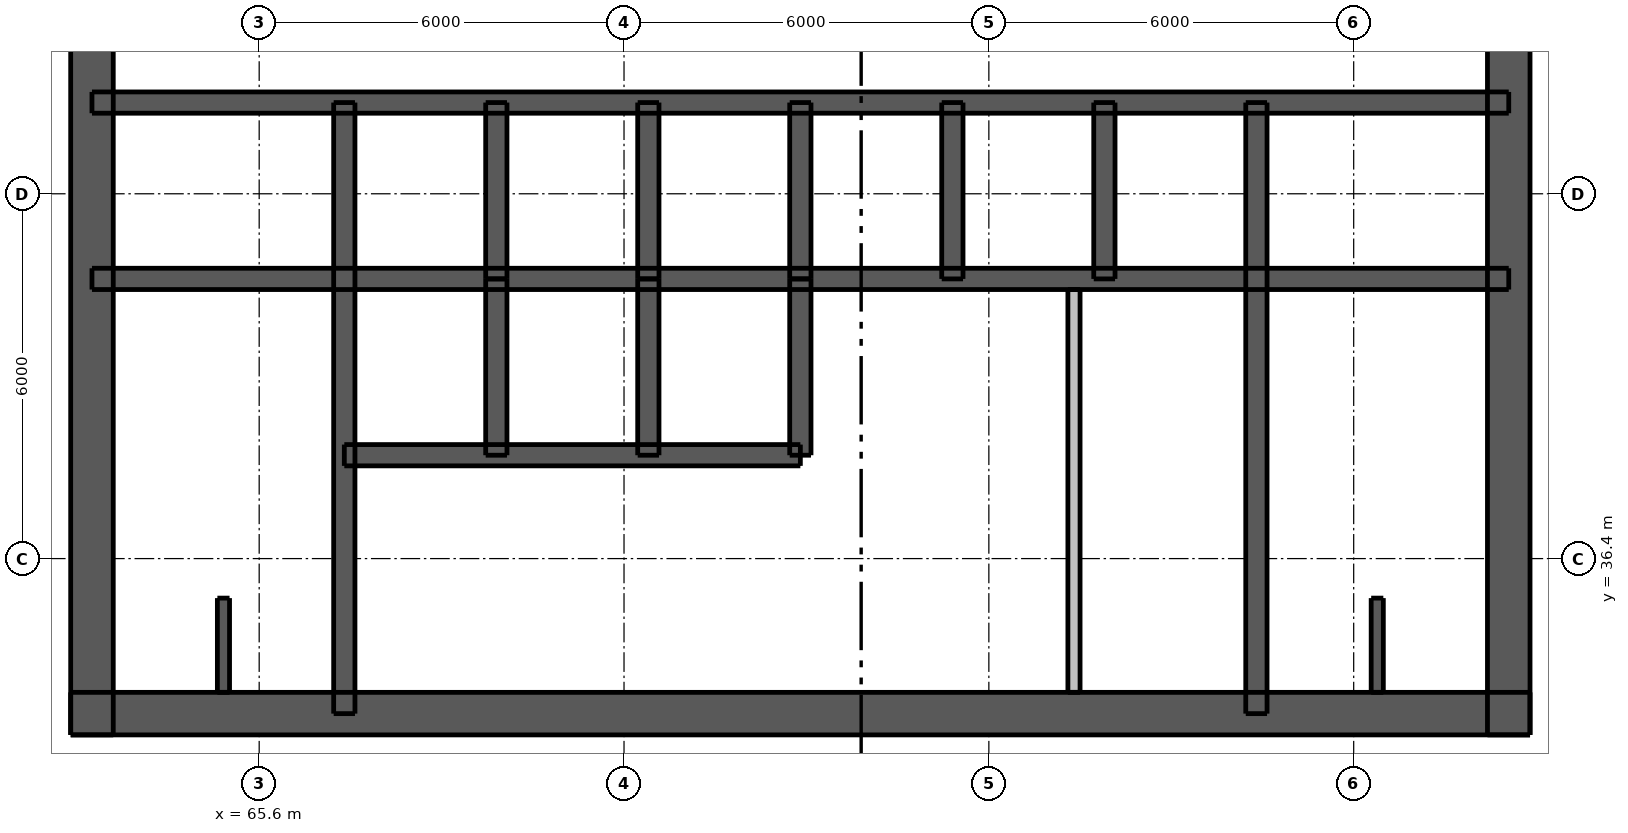
"""IFC4 building model, lengths in metres.
Left out: names, types, materials, properties, quantities, classifications, styles, units other than length and angle.
Written with IfcOpenShell. Run it as: python <this file> out.ifc"""

import sys

from ifc_helpers import new_model, si_unit, direction, frame, frame_2d, origin, place, context, subcontext, project, spatial, rectangle, extrude, element, fill, save


model = new_model("IFC4")
c1 = context("Model", 3, precision=1e-05, world=origin(), true_north=direction((0.0, 1.0)))
c2 = subcontext(c1, "Body", "Model", "MODEL_VIEW")
j1 = project(units=[si_unit("LENGTHUNIT", "METRE"), si_unit("PLANEANGLEUNIT", "RADIAN")], contexts=[c1])
p1 = place(None, origin())
s1 = spatial("IfcSite", under=j1, at=p1, CompositionType="ELEMENT")
p2 = place(p1, origin())
s2 = spatial("IfcBuilding", under=s1, at=p2, CompositionType="ELEMENT")
p3 = place(p2, frame((0.0, 0.0, 178.0)))
s3 = spatial("IfcBuildingStorey", under=s2, at=p3, CompositionType="ELEMENT", Elevation=178.0)
p4 = place(p3, frame((62.5, 33.85, 0.0), z_axis=(0.0, 0.0, 1.0), x_axis=(1.0, 0.0, 0.0)))
e1 = element("IfcWall", 1, at=p4, inside=s3, PredefinedType="SHEAR", context=c2, shape_type="SweptSolid", body=[
    extrude(rectangle(XDim=24.0, YDim=0.7, at=frame_2d((12.0, 0.0))), origin(), (0.0, 0.0, 1.0), 8.75),
])
p5 = place(p4, frame((3.025, 0.0, 0.0)))
e2 = element("IfcOpeningElement", 2, at=p5, cuts=e1, PredefinedType="OPENING", context=c2, shape_type="SweptSolid", body=[
    extrude(rectangle(XDim=1.1, YDim=2.1, at=frame_2d((0.55, 1.05))), frame((0.0, 0.36, 0.0), z_axis=(0.0, -1.0, 0.0), x_axis=(1.0, 0.0, 0.0)), (0.0, 0.0, 1.0), 0.72),
])
p6 = place(p4, frame((0.9, 0.0, 0.0)))
e3 = element("IfcOpeningElement", 3, at=p6, cuts=e1, PredefinedType="OPENING", context=c2, shape_type="SweptSolid", body=[
    extrude(rectangle(XDim=1.1, YDim=2.1, at=frame_2d((0.55, 1.05))), frame((0.0, 0.36, 0.0), z_axis=(0.0, -1.0, 0.0), x_axis=(1.0, 0.0, 0.0)), (0.0, 0.0, 1.0), 0.72),
])
p7 = place(p4, frame((22.0, 0.0, 0.0)))
e4 = element("IfcOpeningElement", 4, at=p7, cuts=e1, PredefinedType="OPENING", context=c2, shape_type="SweptSolid", body=[
    extrude(rectangle(XDim=1.1, YDim=2.1, at=frame_2d((0.55, 1.05))), frame((0.0, 0.36, 0.0), z_axis=(0.0, -1.0, 0.0), x_axis=(1.0, 0.0, 0.0)), (0.0, 0.0, 1.0), 0.72),
])
p8 = place(p4, frame((19.875, 0.0, 0.0)))
e5 = element("IfcOpeningElement", 5, at=p8, cuts=e1, PredefinedType="OPENING", context=c2, shape_type="SweptSolid", body=[
    extrude(rectangle(XDim=1.1, YDim=2.1, at=frame_2d((0.55, 1.05))), frame((0.0, 0.36, 0.0), z_axis=(0.0, -1.0, 0.0), x_axis=(1.0, 0.0, 0.0)), (0.0, 0.0, 1.0), 0.72),
])
p9 = place(p4, frame((7.125, 0.0, 0.0)))
e6 = element("IfcOpeningElement", 6, at=p9, cuts=e1, PredefinedType="OPENING", context=c2, shape_type="SweptSolid", body=[
    extrude(rectangle(XDim=1.1, YDim=2.1, at=frame_2d((0.55, 1.05))), frame((0.0, 0.36, 0.0), z_axis=(0.0, -1.0, 0.0), x_axis=(1.0, 0.0, 0.0)), (0.0, 0.0, 1.0), 0.72),
])
p10 = place(p4, frame((17.5, 0.0, 0.0)))
e7 = element("IfcOpeningElement", 7, at=p10, cuts=e1, PredefinedType="OPENING", context=c2, shape_type="SweptSolid", body=[
    extrude(rectangle(XDim=0.9, YDim=2.1, at=frame_2d((0.45, 1.05))), frame((0.0, 0.36, 0.0), z_axis=(0.0, -1.0, 0.0), x_axis=(1.0, 0.0, 0.0)), (0.0, 0.0, 1.0), 0.72),
])
p11 = place(p3, frame((62.85, 33.5, 0.0), z_axis=(0.0, 0.0, 1.0), x_axis=(0.0, 1.0, 0.0)))
e8 = element("IfcWall", 8, at=p11, inside=s3, PredefinedType="SHEAR", context=c2, shape_type="SweptSolid", body=[
    extrude(rectangle(XDim=24.0, YDim=0.7, at=frame_2d((12.0, 0.0))), origin(), (0.0, 0.0, 1.0), 8.75),
])
p12 = place(p11, frame((11.2, 0.0, 0.0)))
e9 = element("IfcOpeningElement", 9, at=p12, cuts=e8, PredefinedType="OPENING", context=c2, shape_type="SweptSolid", body=[
    extrude(rectangle(XDim=1.6, YDim=2.1, at=frame_2d((0.8, 1.05))), frame((0.0, 0.36, 0.0), z_axis=(0.0, -1.0, 0.0), x_axis=(1.0, 0.0, 0.0)), (0.0, 0.0, 1.0), 0.72),
])
p13 = place(p3, frame((86.15, 33.5, 0.0), z_axis=(0.0, 0.0, 1.0), x_axis=(0.0, 1.0, 0.0)))
e10 = element("IfcWall", 10, at=p13, inside=s3, PredefinedType="SHEAR", context=c2, shape_type="SweptSolid", body=[
    extrude(rectangle(XDim=24.0, YDim=0.7, at=frame_2d((12.0, 0.0))), origin(), (0.0, 0.0, 1.0), 8.75),
])
p14 = place(p13, frame((11.2, 0.0, 0.0)))
e11 = element("IfcOpeningElement", 11, at=p14, cuts=e10, PredefinedType="OPENING", context=c2, shape_type="SweptSolid", body=[
    extrude(rectangle(XDim=1.6, YDim=2.1, at=frame_2d((0.8, 1.05))), frame((0.0, 0.36, 0.0), z_axis=(0.0, -1.0, 0.0), x_axis=(1.0, 0.0, 0.0)), (0.0, 0.0, 1.0), 0.72),
])
p15 = place(p3, frame((62.85, 41.0, 0.0), z_axis=(0.0, 0.0, 1.0), x_axis=(1.0, 0.0, 0.0)))
e12 = element("IfcWall", 12, at=p15, inside=s3, PredefinedType="SHEAR", context=c2, shape_type="SweptSolid", body=[
    extrude(rectangle(XDim=23.3, YDim=0.35, at=frame_2d((11.65, 0.0))), origin(), (0.0, 0.0, 1.0), 8.75),
])
p16 = place(p3, frame((62.85, 43.9, 0.0), z_axis=(0.0, 0.0, 1.0), x_axis=(1.0, 0.0, 0.0)))
e13 = element("IfcWall", 13, at=p16, inside=s3, PredefinedType="SHEAR", context=c2, shape_type="SweptSolid", body=[
    extrude(rectangle(XDim=23.3, YDim=0.35, at=frame_2d((11.65, 0.0))), origin(), (0.0, 0.0, 1.0), 8.75),
])
p17 = place(p16, frame((1.712, 0.0, 0.0)))
e14 = element("IfcOpeningElement", 14, at=p17, cuts=e13, PredefinedType="OPENING", context=c2, shape_type="SweptSolid", body=[
    extrude(rectangle(XDim=0.9, YDim=2.1, at=frame_2d((0.45, 1.05))), frame((0.0, 0.185, 0.0), z_axis=(0.0, -1.0, 0.0), x_axis=(1.0, 0.0, 0.0)), (0.0, 0.0, 1.0), 0.37),
])
p18 = place(p16, frame((20.688, 0.0, 0.0)))
e15 = element("IfcOpeningElement", 15, at=p18, cuts=e13, PredefinedType="OPENING", context=c2, shape_type="SweptSolid", body=[
    extrude(rectangle(XDim=0.9, YDim=2.1, at=frame_2d((0.45, 1.05))), frame((0.0, 0.185, 0.0), z_axis=(0.0, -1.0, 0.0), x_axis=(1.0, 0.0, 0.0)), (0.0, 0.0, 1.0), 0.37),
])
p19 = place(p16, frame((4.95, 0.0, 0.0)))
e16 = element("IfcOpeningElement", 16, at=p19, cuts=e13, PredefinedType="OPENING", context=c2, shape_type="SweptSolid", body=[
    extrude(rectangle(XDim=0.9, YDim=2.1, at=frame_2d((0.45, 1.05))), frame((0.0, 0.185, 0.0), z_axis=(0.0, -1.0, 0.0), x_axis=(1.0, 0.0, 0.0)), (0.0, 0.0, 1.0), 0.37),
])
p20 = place(p16, frame((9.95, 0.0, 0.0)))
e17 = element("IfcOpeningElement", 17, at=p20, cuts=e13, PredefinedType="OPENING", context=c2, shape_type="SweptSolid", body=[
    extrude(rectangle(XDim=0.9, YDim=2.1, at=frame_2d((0.45, 1.05))), frame((0.0, 0.185, 0.0), z_axis=(0.0, -1.0, 0.0), x_axis=(1.0, 0.0, 0.0)), (0.0, 0.0, 1.0), 0.37),
])
p21 = place(p16, frame((12.45, 0.0, 0.0)))
e18 = element("IfcOpeningElement", 18, at=p21, cuts=e13, PredefinedType="OPENING", context=c2, shape_type="SweptSolid", body=[
    extrude(rectangle(XDim=0.9, YDim=2.1, at=frame_2d((0.45, 1.05))), frame((0.0, 0.185, 0.0), z_axis=(0.0, -1.0, 0.0), x_axis=(1.0, 0.0, 0.0)), (0.0, 0.0, 1.0), 0.37),
])
p22 = place(p16, frame((17.45, 0.0, 0.0)))
e19 = element("IfcOpeningElement", 19, at=p22, cuts=e13, PredefinedType="OPENING", context=c2, shape_type="SweptSolid", body=[
    extrude(rectangle(XDim=0.9, YDim=2.1, at=frame_2d((0.45, 1.05))), frame((0.0, 0.185, 0.0), z_axis=(0.0, -1.0, 0.0), x_axis=(1.0, 0.0, 0.0)), (0.0, 0.0, 1.0), 0.37),
])
for number, where, z_axis, x_axis in (
    (20, (67.0, 33.85, 0.0), (0.0, 0.0, 1.0), (0.0, 1.0, 0.0)),
    (21, (82.0, 33.85, 0.0), (0.0, 0.0, 1.0), (0.0, 1.0, 0.0)),
):
    element("IfcWall", number, at=place(p3, frame(where, z_axis=z_axis, x_axis=x_axis)), inside=s3, PredefinedType="SHEAR", context=c2, shape_type="SweptSolid", body=[
        extrude(rectangle(XDim=10.05, YDim=0.35, at=frame_2d((5.025, 0.0))), origin(), (0.0, 0.0, 1.0), 8.75),
    ])
for number, where, z_axis, x_axis in (
    (22, (69.5, 41.0, 0.0), (0.0, 0.0, 1.0), (0.0, 1.0, 0.0)),
    (23, (72.0, 41.0, 0.0), (0.0, 0.0, 1.0), (0.0, 1.0, 0.0)),
    (24, (74.5, 41.0, 0.0), (0.0, 0.0, 1.0), (0.0, 1.0, 0.0)),
    (25, (77.0, 41.0, 0.0), (0.0, 0.0, 1.0), (0.0, 1.0, 0.0)),
    (26, (79.5, 41.0, 0.0), (0.0, 0.0, 1.0), (0.0, 1.0, 0.0)),
):
    element("IfcWall", number, at=place(p3, frame(where, z_axis=z_axis, x_axis=x_axis)), inside=s3, PredefinedType="SHEAR", context=c2, shape_type="SweptSolid", body=[
        extrude(rectangle(XDim=2.9, YDim=0.35, at=frame_2d((1.45, 0.0))), origin(), (0.0, 0.0, 1.0), 8.75),
    ])
p23 = place(p3, frame((67.0, 38.1, 0.0), z_axis=(0.0, 0.0, 1.0), x_axis=(1.0, 0.0, 0.0)))
e27 = element("IfcWall", 27, at=p23, inside=s3, PredefinedType="SHEAR", context=c2, shape_type="SweptSolid", body=[
    extrude(rectangle(XDim=7.5, YDim=0.35, at=frame_2d((3.75, 0.0))), origin(), (0.0, 0.0, 1.0), 8.75),
])
p24 = place(p23, frame((0.7, 0.0, 0.0)))
e28 = element("IfcOpeningElement", 28, at=p24, cuts=e27, PredefinedType="OPENING", context=c2, shape_type="SweptSolid", body=[
    extrude(rectangle(XDim=1.1, YDim=2.1, at=frame_2d((0.55, 1.05))), frame((0.0, 0.185, 0.0), z_axis=(0.0, -1.0, 0.0), x_axis=(1.0, 0.0, 0.0)), (0.0, 0.0, 1.0), 0.37),
])
p25 = place(p23, frame((3.2, 0.0, 0.0)))
e29 = element("IfcOpeningElement", 29, at=p25, cuts=e27, PredefinedType="OPENING", context=c2, shape_type="SweptSolid", body=[
    extrude(rectangle(XDim=1.1, YDim=2.1, at=frame_2d((0.55, 1.05))), frame((0.0, 0.185, 0.0), z_axis=(0.0, -1.0, 0.0), x_axis=(1.0, 0.0, 0.0)), (0.0, 0.0, 1.0), 0.37),
])
p26 = place(p23, frame((5.65, 0.0, 0.0)))
e30 = element("IfcOpeningElement", 30, at=p26, cuts=e27, PredefinedType="OPENING", context=c2, shape_type="SweptSolid", body=[
    extrude(rectangle(XDim=1.2, YDim=2.1, at=frame_2d((0.6, 1.05))), frame((0.0, 0.185, 0.0), z_axis=(0.0, -1.0, 0.0), x_axis=(1.0, 0.0, 0.0)), (0.0, 0.0, 1.0), 0.37),
])
for number, where, z_axis, x_axis in (
    (31, (69.5, 38.1, 0.0), (0.0, 0.0, 1.0), (0.0, 1.0, 0.0)),
    (32, (72.0, 38.1, 0.0), (0.0, 0.0, 1.0), (0.0, 1.0, 0.0)),
    (33, (74.5, 38.1, 0.0), (0.0, 0.0, 1.0), (0.0, 1.0, 0.0)),
):
    element("IfcWall", number, at=place(p3, frame(where, z_axis=z_axis, x_axis=x_axis)), inside=s3, PredefinedType="SHEAR", context=c2, shape_type="SweptSolid", body=[
        extrude(rectangle(XDim=2.9, YDim=0.35, at=frame_2d((1.45, 0.0))), origin(), (0.0, 0.0, 1.0), 8.75),
    ])
p27 = place(p3, frame((79.0, 34.2, 0.0), z_axis=(0.0, 0.0, 1.0), x_axis=(0.0, 1.0, 0.0)))
e34 = element("IfcWall", 34, at=p27, inside=s3, PredefinedType="PLUMBINGWALL", context=c2, shape_type="SweptSolid", body=[
    extrude(rectangle(XDim=6.625, YDim=0.2, at=frame_2d((3.312, 0.0))), origin(), (0.0, 0.0, 1.0), 8.75),
])
for number, where, z_axis, x_axis in (
    (35, (65.012, 34.2, 0.0), (0.0, 0.0, 1.0), (0.0, 1.0, 0.0)),
    (36, (83.988, 34.2, 0.0), (0.0, 0.0, 1.0), (0.0, 1.0, 0.0)),
):
    element("IfcWall", number, at=place(p3, frame(where, z_axis=z_axis, x_axis=x_axis)), inside=s3, PredefinedType="SHEAR", context=c2, shape_type="SweptSolid", body=[
        extrude(rectangle(XDim=1.55, YDim=0.2, at=frame_2d((0.775, 0.0))), origin(), (0.0, 0.0, 1.0), 8.75),
    ])
p28 = place(p5, origin())
e37 = element("IfcDoor", 37, at=p28, inside=s3, OperationType="SINGLE_SWING_LEFT", PredefinedType="DOOR", context=c2, shape_type="SweptSolid", body=[
    extrude(rectangle(XDim=1.1, YDim=2.1, at=frame_2d((0.55, 1.05))), frame((0.0, 0.337, 0.0), z_axis=(0.0, -1.0, 0.0), x_axis=(1.0, 0.0, 0.0)), (0.0, 0.0, 1.0), 0.05),
])
fill(e2, e37)
p29 = place(p6, origin())
e38 = element("IfcDoor", 38, at=p29, inside=s3, OperationType="SINGLE_SWING_LEFT", PredefinedType="DOOR", context=c2, shape_type="SweptSolid", body=[
    extrude(rectangle(XDim=1.1, YDim=2.1, at=frame_2d((0.55, 1.05))), frame((0.0, 0.337, 0.0), z_axis=(0.0, -1.0, 0.0), x_axis=(1.0, 0.0, 0.0)), (0.0, 0.0, 1.0), 0.05),
])
fill(e3, e38)
p30 = place(p7, origin())
e39 = element("IfcDoor", 39, at=p30, inside=s3, OperationType="SINGLE_SWING_RIGHT", PredefinedType="DOOR", context=c2, shape_type="SweptSolid", body=[
    extrude(rectangle(XDim=1.1, YDim=2.1, at=frame_2d((0.55, 1.05))), frame((0.0, 0.337, 0.0), z_axis=(0.0, -1.0, 0.0), x_axis=(1.0, 0.0, 0.0)), (0.0, 0.0, 1.0), 0.05),
])
fill(e4, e39)
p31 = place(p8, origin())
e40 = element("IfcDoor", 40, at=p31, inside=s3, OperationType="SINGLE_SWING_RIGHT", PredefinedType="DOOR", context=c2, shape_type="SweptSolid", body=[
    extrude(rectangle(XDim=1.1, YDim=2.1, at=frame_2d((0.55, 1.05))), frame((0.0, 0.337, 0.0), z_axis=(0.0, -1.0, 0.0), x_axis=(1.0, 0.0, 0.0)), (0.0, 0.0, 1.0), 0.05),
])
fill(e5, e40)
p32 = place(p12, origin())
e41 = element("IfcDoor", 41, at=p32, inside=s3, OperationType="DOUBLE_DOOR_SINGLE_SWING", PredefinedType="DOOR", context=c2, shape_type="SweptSolid", body=[
    extrude(rectangle(XDim=1.6, YDim=2.1, at=frame_2d((0.8, 1.05))), frame((0.0, -0.288, 0.0), z_axis=(0.0, -1.0, 0.0), x_axis=(1.0, 0.0, 0.0)), (0.0, 0.0, 1.0), 0.05),
])
fill(e9, e41)
p33 = place(p14, origin())
e42 = element("IfcDoor", 42, at=p33, inside=s3, OperationType="DOUBLE_DOOR_SINGLE_SWING", PredefinedType="DOOR", context=c2, shape_type="SweptSolid", body=[
    extrude(rectangle(XDim=1.6, YDim=2.1, at=frame_2d((0.8, 1.05))), frame((0.0, 0.337, 0.0), z_axis=(0.0, -1.0, 0.0), x_axis=(1.0, 0.0, 0.0)), (0.0, 0.0, 1.0), 0.05),
])
fill(e11, e42)
p34 = place(p9, origin())
e43 = element("IfcDoor", 43, at=p34, inside=s3, OperationType="SINGLE_SWING_LEFT", PredefinedType="DOOR", context=c2, shape_type="SweptSolid", body=[
    extrude(rectangle(XDim=1.1, YDim=2.1, at=frame_2d((0.55, 1.05))), frame((0.0, 0.337, 0.0), z_axis=(0.0, -1.0, 0.0), x_axis=(1.0, 0.0, 0.0)), (0.0, 0.0, 1.0), 0.05),
])
fill(e6, e43)
p35 = place(p10, origin())
e44 = element("IfcDoor", 44, at=p35, inside=s3, OperationType="SINGLE_SWING_LEFT", PredefinedType="DOOR", context=c2, shape_type="SweptSolid", body=[
    extrude(rectangle(XDim=0.9, YDim=2.1, at=frame_2d((0.45, 1.05))), frame((0.0, 0.337, 0.0), z_axis=(0.0, -1.0, 0.0), x_axis=(1.0, 0.0, 0.0)), (0.0, 0.0, 1.0), 0.05),
])
fill(e7, e44)
p36 = place(p17, origin())
e45 = element("IfcDoor", 45, at=p36, inside=s3, OperationType="SINGLE_SWING_LEFT", PredefinedType="DOOR", context=c2, shape_type="SweptSolid", body=[
    extrude(rectangle(XDim=0.9, YDim=2.1, at=frame_2d((0.45, 1.05))), frame((0.0, -0.112, 0.0), z_axis=(0.0, -1.0, 0.0), x_axis=(1.0, 0.0, 0.0)), (0.0, 0.0, 1.0), 0.05),
])
fill(e14, e45)
p37 = place(p18, origin())
e46 = element("IfcDoor", 46, at=p37, inside=s3, OperationType="SINGLE_SWING_LEFT", PredefinedType="DOOR", context=c2, shape_type="SweptSolid", body=[
    extrude(rectangle(XDim=0.9, YDim=2.1, at=frame_2d((0.45, 1.05))), frame((0.0, -0.112, 0.0), z_axis=(0.0, -1.0, 0.0), x_axis=(1.0, 0.0, 0.0)), (0.0, 0.0, 1.0), 0.05),
])
fill(e15, e46)
p38 = place(p19, origin())
e47 = element("IfcDoor", 47, at=p38, inside=s3, OperationType="SINGLE_SWING_RIGHT", PredefinedType="DOOR", context=c2, shape_type="SweptSolid", body=[
    extrude(rectangle(XDim=0.9, YDim=2.1, at=frame_2d((0.45, 1.05))), frame((0.0, -0.112, 0.0), z_axis=(0.0, -1.0, 0.0), x_axis=(1.0, 0.0, 0.0)), (0.0, 0.0, 1.0), 0.05),
])
fill(e16, e47)
p39 = place(p20, origin())
e48 = element("IfcDoor", 48, at=p39, inside=s3, OperationType="SINGLE_SWING_RIGHT", PredefinedType="DOOR", context=c2, shape_type="SweptSolid", body=[
    extrude(rectangle(XDim=0.9, YDim=2.1, at=frame_2d((0.45, 1.05))), frame((0.0, -0.112, 0.0), z_axis=(0.0, -1.0, 0.0), x_axis=(1.0, 0.0, 0.0)), (0.0, 0.0, 1.0), 0.05),
])
fill(e17, e48)
p40 = place(p21, origin())
e49 = element("IfcDoor", 49, at=p40, inside=s3, OperationType="SINGLE_SWING_LEFT", PredefinedType="DOOR", context=c2, shape_type="SweptSolid", body=[
    extrude(rectangle(XDim=0.9, YDim=2.1, at=frame_2d((0.45, 1.05))), frame((0.0, -0.112, 0.0), z_axis=(0.0, -1.0, 0.0), x_axis=(1.0, 0.0, 0.0)), (0.0, 0.0, 1.0), 0.05),
])
fill(e18, e49)
p41 = place(p22, origin())
e50 = element("IfcDoor", 50, at=p41, inside=s3, OperationType="SINGLE_SWING_LEFT", PredefinedType="DOOR", context=c2, shape_type="SweptSolid", body=[
    extrude(rectangle(XDim=0.9, YDim=2.1, at=frame_2d((0.45, 1.05))), frame((0.0, -0.112, 0.0), z_axis=(0.0, -1.0, 0.0), x_axis=(1.0, 0.0, 0.0)), (0.0, 0.0, 1.0), 0.05),
])
fill(e19, e50)
p42 = place(p24, origin())
e51 = element("IfcDoor", 51, at=p42, inside=s3, OperationType="DOUBLE_DOOR_SLIDING", PredefinedType="DOOR", context=c2, shape_type="SweptSolid", body=[
    extrude(rectangle(XDim=1.1, YDim=2.1, at=frame_2d((0.55, 1.05))), frame((0.0, 0.025, 0.0), z_axis=(0.0, -1.0, 0.0), x_axis=(1.0, 0.0, 0.0)), (0.0, 0.0, 1.0), 0.05),
])
fill(e28, e51)
p43 = place(p25, origin())
e52 = element("IfcDoor", 52, at=p43, inside=s3, OperationType="DOUBLE_DOOR_SLIDING", PredefinedType="DOOR", context=c2, shape_type="SweptSolid", body=[
    extrude(rectangle(XDim=1.1, YDim=2.1, at=frame_2d((0.55, 1.05))), frame((0.0, 0.025, 0.0), z_axis=(0.0, -1.0, 0.0), x_axis=(1.0, 0.0, 0.0)), (0.0, 0.0, 1.0), 0.05),
])
fill(e29, e52)
p44 = place(p26, origin())
e53 = element("IfcDoor", 53, at=p44, inside=s3, OperationType="DOUBLE_DOOR_SLIDING", PredefinedType="DOOR", context=c2, shape_type="SweptSolid", body=[
    extrude(rectangle(XDim=1.2, YDim=2.1, at=frame_2d((0.6, 1.05))), frame((0.0, 0.025, 0.0), z_axis=(0.0, -1.0, 0.0), x_axis=(1.0, 0.0, 0.0)), (0.0, 0.0, 1.0), 0.05),
])
fill(e30, e53)
save(model, sys.argv[1])
